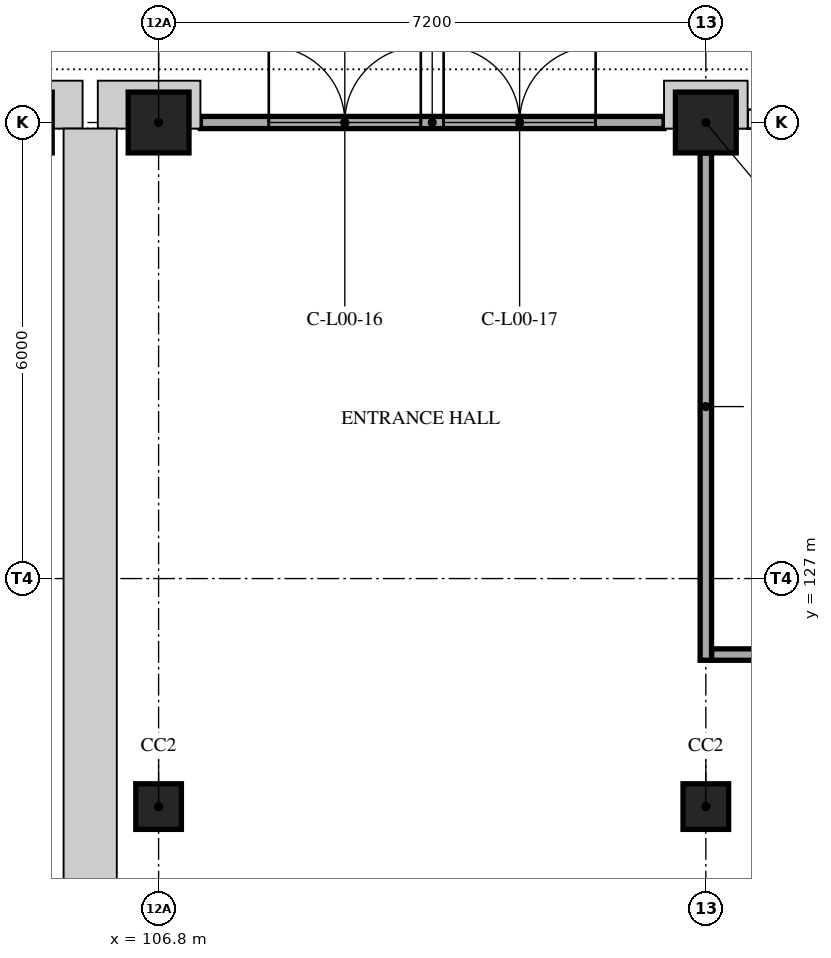
"""IFC4 building model, lengths in metres.
Left out: names, types, materials, properties, quantities, classifications, styles, units other than length and angle.
Written with IfcOpenShell. Run it as: python <this file> out.ifc"""

import sys

from ifc_helpers import new_model, si_unit, direction, frame, frame_2d, origin, origin_2d, place, context, subcontext, project, spatial, rectangle, extrude, element, fill, save


model = new_model("IFC4")
c1 = context("Model", 3, precision=1e-05, world=origin(), true_north=direction((0.0, 1.0)))
c2 = subcontext(c1, "Body", "Model", "MODEL_VIEW")
j1 = project(units=[si_unit("LENGTHUNIT", "METRE"), si_unit("PLANEANGLEUNIT", "RADIAN")], contexts=[c1])
p1 = place(None, origin())
s1 = spatial("IfcSite", under=j1, at=p1, CompositionType="ELEMENT")
p2 = place(p1, origin())
s2 = spatial("IfcBuilding", under=s1, at=p2, CompositionType="ELEMENT")
p3 = place(p2, origin())
s3 = spatial("IfcBuildingStorey", under=s2, at=p3, CompositionType="ELEMENT", Elevation=0.0)
p4 = place(p3, frame((105.0, 133.0, 0.0), z_axis=(0.0, 0.0, 1.0), x_axis=(1.0, 0.0, 0.0)))
e1 = element("IfcColumn", 1, at=p4, inside=s3, PredefinedType="COLUMN", context=c2, shape_type="SweptSolid", body=[
    extrude(rectangle(XDim=0.8, YDim=0.8, at=origin_2d()), origin(), (0.0, 0.0, 1.0), 5.0),
])
p5 = place(p3, frame((106.8, 124.0, 0.0), z_axis=(0.0, 0.0, 1.0), x_axis=(1.0, 0.0, 0.0)))
e2 = element("IfcColumn", 2, at=p5, inside=s3, PredefinedType="COLUMN", context=c2, shape_type="SweptSolid", body=[
    extrude(rectangle(XDim=0.6, YDim=0.6, at=origin_2d()), origin(), (0.0, 0.0, 1.0), 5.0),
])
p6 = place(p3, frame((106.8, 133.0, 0.0), z_axis=(0.0, 0.0, 1.0), x_axis=(1.0, 0.0, 0.0)))
e3 = element("IfcColumn", 3, at=p6, inside=s3, PredefinedType="COLUMN", context=c2, shape_type="SweptSolid", body=[
    extrude(rectangle(XDim=0.8, YDim=0.8, at=origin_2d()), origin(), (0.0, 0.0, 1.0), 5.0),
])
p7 = place(p3, frame((114.0, 124.0, 0.0), z_axis=(0.0, 0.0, 1.0), x_axis=(1.0, 0.0, 0.0)))
e4 = element("IfcColumn", 4, at=p7, inside=s3, PredefinedType="COLUMN", context=c2, shape_type="SweptSolid", body=[
    extrude(rectangle(XDim=0.6, YDim=0.6, at=origin_2d()), origin(), (0.0, 0.0, 1.0), 5.0),
])
p8 = place(p3, frame((114.0, 133.0, 0.0), z_axis=(0.0, 0.0, 1.0), x_axis=(1.0, 0.0, 0.0)))
e5 = element("IfcColumn", 5, at=p8, inside=s3, PredefinedType="COLUMN", context=c2, shape_type="SweptSolid", body=[
    extrude(rectangle(XDim=0.8, YDim=0.8, at=origin_2d()), origin(), (0.0, 0.0, 1.0), 5.0),
])
p9 = place(p3, frame((107.35, 133.0, 0.0), z_axis=(0.0, 0.0, 1.0), x_axis=(1.0, 0.0, 0.0)))
e6 = element("IfcWall", 6, at=p9, inside=s3, PredefinedType="STANDARD", context=c2, shape_type="SweptSolid", body=[
    extrude(rectangle(XDim=6.1, YDim=0.16, at=frame_2d((3.05, 0.0))), origin(), (0.0, 0.0, 1.0), 5.0),
])
p10 = place(p9, frame((0.9, 0.0, 0.0)))
e7 = element("IfcOpeningElement", 7, at=p10, cuts=e6, PredefinedType="OPENING", context=c2, shape_type="SweptSolid", body=[
    extrude(rectangle(XDim=2.0, YDim=2.4, at=frame_2d((1.0, 1.2))), frame((0.0, 0.09, 0.0), z_axis=(0.0, -1.0, 0.0), x_axis=(1.0, 0.0, 0.0)), (0.0, 0.0, 1.0), 0.18),
])
p11 = place(p9, frame((0.9, 0.0, 2.6)))
e8 = element("IfcOpeningElement", 8, at=p11, cuts=e6, PredefinedType="OPENING", context=c2, shape_type="SweptSolid", body=[
    extrude(rectangle(XDim=2.0, YDim=2.1, at=frame_2d((1.0, 1.05))), frame((0.0, 0.09, 0.0), z_axis=(0.0, -1.0, 0.0), x_axis=(1.0, 0.0, 0.0)), (0.0, 0.0, 1.0), 0.18),
])
p12 = place(p9, frame((3.2, 0.0, 0.0)))
e9 = element("IfcOpeningElement", 9, at=p12, cuts=e6, PredefinedType="OPENING", context=c2, shape_type="SweptSolid", body=[
    extrude(rectangle(XDim=2.0, YDim=2.4, at=frame_2d((1.0, 1.2))), frame((0.0, 0.09, 0.0), z_axis=(0.0, -1.0, 0.0), x_axis=(1.0, 0.0, 0.0)), (0.0, 0.0, 1.0), 0.18),
])
p13 = place(p9, frame((3.2, 0.0, 2.6)))
e10 = element("IfcOpeningElement", 10, at=p13, cuts=e6, PredefinedType="OPENING", context=c2, shape_type="SweptSolid", body=[
    extrude(rectangle(XDim=2.0, YDim=2.1, at=frame_2d((1.0, 1.05))), frame((0.0, 0.09, 0.0), z_axis=(0.0, -1.0, 0.0), x_axis=(1.0, 0.0, 0.0)), (0.0, 0.0, 1.0), 0.18),
])
p14 = place(p3, frame((114.075, 126.0, 0.0), z_axis=(0.0, 0.0, 1.0), x_axis=(1.0, 0.0, 0.0)))
e11 = element("IfcWall", 11, at=p14, inside=s3, PredefinedType="PARTITIONING", context=c2, shape_type="SweptSolid", body=[
    extrude(rectangle(XDim=8.85, YDim=0.15, at=frame_2d((4.425, 0.0))), origin(), (0.0, 0.0, 1.0), 4.8),
])
p15 = place(p14, frame((0.6, 0.0, 0.0)))
e12 = element("IfcOpeningElement", 12, at=p15, cuts=e11, PredefinedType="OPENING", context=c2, shape_type="SweptSolid", body=[
    extrude(rectangle(XDim=1.0, YDim=2.1, at=frame_2d((0.5, 1.05))), frame((0.0, 0.085, 0.0), z_axis=(0.0, -1.0, 0.0), x_axis=(1.0, 0.0, 0.0)), (0.0, 0.0, 1.0), 0.17),
])
p16 = place(p3, frame((114.0, 125.925, 0.0), z_axis=(0.0, 0.0, 1.0), x_axis=(0.0, 1.0, 0.0)))
e13 = element("IfcWall", 13, at=p16, inside=s3, PredefinedType="PARTITIONING", context=c2, shape_type="SweptSolid", body=[
    extrude(rectangle(XDim=6.675, YDim=0.15, at=frame_2d((3.337, 0.0))), origin(), (0.0, 0.0, 1.0), 4.0),
])
p17 = place(p10, origin())
e14 = element("IfcDoor", 14, at=p17, inside=s3, OperationType="DOUBLE_DOOR_SINGLE_SWING", PredefinedType="NOTDEFINED", context=c2, shape_type="SweptSolid", body=[
    extrude(rectangle(XDim=2.0, YDim=2.4, at=frame_2d((1.0, 1.2))), frame((0.0, 0.025, 0.0), z_axis=(0.0, -1.0, 0.0), x_axis=(1.0, 0.0, 0.0)), (0.0, 0.0, 1.0), 0.05),
])
fill(e7, e14)
p18 = place(p11, origin())
e15 = element("IfcWindow", 15, at=p18, inside=s3, PartitioningType="SINGLE_PANEL", PredefinedType="WINDOW", context=c2, shape_type="SweptSolid", body=[
    extrude(rectangle(XDim=2.0, YDim=2.1, at=frame_2d((1.0, 1.05))), frame((0.0, 0.03, 0.0), z_axis=(0.0, -1.0, 0.0), x_axis=(1.0, 0.0, 0.0)), (0.0, 0.0, 1.0), 0.06),
])
fill(e8, e15)
p19 = place(p12, origin())
e16 = element("IfcDoor", 16, at=p19, inside=s3, OperationType="DOUBLE_DOOR_SINGLE_SWING", PredefinedType="NOTDEFINED", context=c2, shape_type="SweptSolid", body=[
    extrude(rectangle(XDim=2.0, YDim=2.4, at=frame_2d((1.0, 1.2))), frame((0.0, 0.025, 0.0), z_axis=(0.0, -1.0, 0.0), x_axis=(1.0, 0.0, 0.0)), (0.0, 0.0, 1.0), 0.05),
])
fill(e9, e16)
p20 = place(p13, origin())
e17 = element("IfcWindow", 17, at=p20, inside=s3, PartitioningType="SINGLE_PANEL", PredefinedType="WINDOW", context=c2, shape_type="SweptSolid", body=[
    extrude(rectangle(XDim=2.0, YDim=2.1, at=frame_2d((1.0, 1.05))), frame((0.0, 0.03, 0.0), z_axis=(0.0, -1.0, 0.0), x_axis=(1.0, 0.0, 0.0)), (0.0, 0.0, 1.0), 0.06),
])
fill(e10, e17)
save(model, sys.argv[1])
